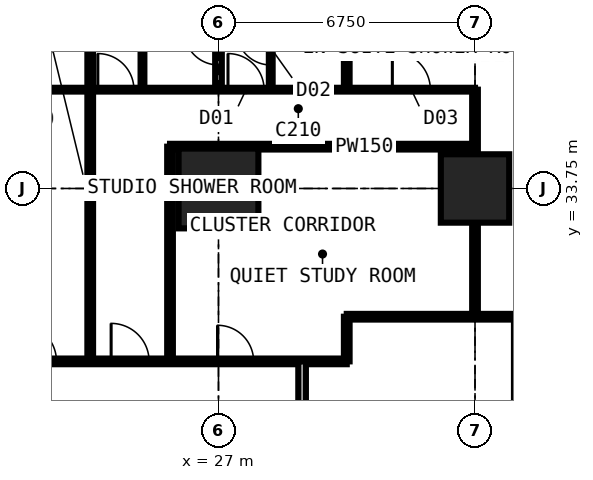
"""IFC4 building model, lengths in metres.
Left out: names, types, materials, properties, quantities, classifications, styles, units other than length and angle.
Written with IfcOpenShell. Run it as: python <this file> out.ifc"""

import sys

from ifc_helpers import new_model, si_unit, direction, frame, frame_2d, origin, origin_2d, place, context, subcontext, project, spatial, rectangle, extrude, element, fill, save


model = new_model("IFC4")
c1 = context("Model", 3, precision=1e-05, world=origin(), true_north=direction((0.0, 1.0)))
c2 = subcontext(c1, "Body", "Model", "MODEL_VIEW")
j1 = project(units=[si_unit("LENGTHUNIT", "METRE"), si_unit("PLANEANGLEUNIT", "RADIAN")], contexts=[c1])
p1 = place(None, origin())
s1 = spatial("IfcSite", under=j1, at=p1, CompositionType="ELEMENT")
p2 = place(p1, origin())
s2 = spatial("IfcBuilding", under=s1, at=p2, CompositionType="ELEMENT")
p3 = place(p2, frame((0.0, 0.0, 72.0)))
s3 = spatial("IfcBuildingStorey", under=s2, at=p3, CompositionType="ELEMENT", Elevation=72.0)
p4 = place(p3, frame((27.0, 33.75, 0.0), z_axis=(0.0, 0.0, 1.0), x_axis=(1.0, 0.0, 0.0)))
e1 = element("IfcColumn", 1, at=p4, inside=s3, PredefinedType="COLUMN", context=c2, shape_type="SweptSolid", body=[
    extrude(rectangle(XDim=2.1, YDim=2.1, at=origin_2d()), origin(), (0.0, 0.0, 1.0), 3.6),
])
p5 = place(p3, frame((33.75, 33.75, 0.0), z_axis=(0.0, 0.0, 1.0), x_axis=(1.0, 0.0, 0.0)))
e2 = element("IfcColumn", 2, at=p5, inside=s3, PredefinedType="COLUMN", context=c2, shape_type="SweptSolid", body=[
    extrude(rectangle(XDim=1.8, YDim=1.8, at=origin_2d()), origin(), (0.0, 0.0, 1.0), 3.6),
])
p6 = place(p3, frame((10.125, 36.35, 0.0), z_axis=(0.0, 0.0, 1.0), x_axis=(1.0, 0.0, 0.0)))
e3 = element("IfcWall", 3, at=p6, inside=s3, PredefinedType="PARTITIONING", context=c2, shape_type="SweptSolid", body=[
    extrude(rectangle(XDim=23.625, YDim=0.1, at=frame_2d((11.812, 0.0))), origin(), (0.0, 0.0, 1.0), 3.3),
])
p7 = place(p6, frame((21.45, 0.0, 0.0)))
e4 = element("IfcOpeningElement", 4, at=p7, cuts=e3, PredefinedType="OPENING", context=c2, shape_type="SweptSolid", body=[
    extrude(rectangle(XDim=1.0, YDim=2.2, at=frame_2d((0.5, 1.1))), frame((0.0, 0.06, 0.0), z_axis=(0.0, -1.0, 0.0), x_axis=(1.0, 0.0, 0.0)), (0.0, 0.0, 1.0), 0.12),
])
p8 = place(p6, frame((17.125, 0.0, 0.0)))
e5 = element("IfcOpeningElement", 5, at=p8, cuts=e3, PredefinedType="OPENING", context=c2, shape_type="SweptSolid", body=[
    extrude(rectangle(XDim=0.95, YDim=2.2, at=frame_2d((0.475, 1.1))), frame((0.0, 0.06, 0.0), z_axis=(0.0, -1.0, 0.0), x_axis=(1.0, 0.0, 0.0)), (0.0, 0.0, 1.0), 0.12),
])
p9 = place(p6, frame((13.7, 0.0, 0.0)))
e6 = element("IfcOpeningElement", 6, at=p9, cuts=e3, PredefinedType="OPENING", context=c2, shape_type="SweptSolid", body=[
    extrude(rectangle(XDim=0.95, YDim=2.2, at=frame_2d((0.475, 1.1))), frame((0.0, 0.06, 0.0), z_axis=(0.0, -1.0, 0.0), x_axis=(1.0, 0.0, 0.0)), (0.0, 0.0, 1.0), 0.12),
])
p10 = place(p6, frame((0.2, 0.0, 0.0)))
e7 = element("IfcOpeningElement", 7, at=p10, cuts=e3, PredefinedType="OPENING", context=c2, shape_type="SweptSolid", body=[
    extrude(rectangle(XDim=0.95, YDim=2.2, at=frame_2d((0.475, 1.1))), frame((0.0, 0.06, 0.0), z_axis=(0.0, -1.0, 0.0), x_axis=(1.0, 0.0, 0.0)), (0.0, 0.0, 1.0), 0.12),
])
p11 = place(p6, frame((3.625, 0.0, 0.0)))
e8 = element("IfcOpeningElement", 8, at=p11, cuts=e3, PredefinedType="OPENING", context=c2, shape_type="SweptSolid", body=[
    extrude(rectangle(XDim=0.95, YDim=2.2, at=frame_2d((0.475, 1.1))), frame((0.0, 0.06, 0.0), z_axis=(0.0, -1.0, 0.0), x_axis=(1.0, 0.0, 0.0)), (0.0, 0.0, 1.0), 0.12),
])
p12 = place(p6, frame((7.0, 0.0, 0.0)))
e9 = element("IfcOpeningElement", 9, at=p12, cuts=e3, PredefinedType="OPENING", context=c2, shape_type="SweptSolid", body=[
    extrude(rectangle(XDim=0.95, YDim=2.2, at=frame_2d((0.475, 1.1))), frame((0.0, 0.06, 0.0), z_axis=(0.0, -1.0, 0.0), x_axis=(1.0, 0.0, 0.0)), (0.0, 0.0, 1.0), 0.12),
])
p13 = place(p6, frame((10.375, 0.0, 0.0)))
e10 = element("IfcOpeningElement", 10, at=p13, cuts=e3, PredefinedType="OPENING", context=c2, shape_type="SweptSolid", body=[
    extrude(rectangle(XDim=0.95, YDim=2.2, at=frame_2d((0.475, 1.1))), frame((0.0, 0.06, 0.0), z_axis=(0.0, -1.0, 0.0), x_axis=(1.0, 0.0, 0.0)), (0.0, 0.0, 1.0), 0.12),
])
p14 = place(p3, frame((11.3, 29.2, 0.0), z_axis=(0.0, 0.0, 1.0), x_axis=(1.0, 0.0, 0.0)))
e11 = element("IfcWall", 11, at=p14, inside=s3, PredefinedType="PARTITIONING", context=c2, shape_type="SweptSolid", body=[
    extrude(rectangle(XDim=19.075, YDim=0.15, at=frame_2d((9.538, 0.0))), origin(), (0.0, 0.0, 1.0), 3.3),
])
p15 = place(p14, frame((12.875, 0.0, 0.0)))
e12 = element("IfcOpeningElement", 12, at=p15, cuts=e11, PredefinedType="OPENING", context=c2, shape_type="SweptSolid", body=[
    extrude(rectangle(XDim=1.0, YDim=2.2, at=frame_2d((0.5, 1.1))), frame((0.0, 0.085, 0.0), z_axis=(0.0, -1.0, 0.0), x_axis=(1.0, 0.0, 0.0)), (0.0, 0.0, 1.0), 0.17),
])
p16 = place(p14, frame((10.438, 0.0, 0.0)))
e13 = element("IfcOpeningElement", 13, at=p16, cuts=e11, PredefinedType="OPENING", context=c2, shape_type="SweptSolid", body=[
    extrude(rectangle(XDim=1.0, YDim=2.2, at=frame_2d((0.5, 1.1))), frame((0.0, 0.085, 0.0), z_axis=(0.0, -1.0, 0.0), x_axis=(1.0, 0.0, 0.0)), (0.0, 0.0, 1.0), 0.17),
])
p17 = place(p14, frame((15.675, 0.0, 0.0)))
e14 = element("IfcOpeningElement", 14, at=p17, cuts=e11, PredefinedType="OPENING", context=c2, shape_type="SweptSolid", body=[
    extrude(rectangle(XDim=0.95, YDim=2.2, at=frame_2d((0.475, 1.1))), frame((0.0, 0.085, 0.0), z_axis=(0.0, -1.0, 0.0), x_axis=(1.0, 0.0, 0.0)), (0.0, 0.0, 1.0), 0.17),
])
p18 = place(p3, frame((23.625, 29.2, 0.0), z_axis=(0.0, 0.0, 1.0), x_axis=(0.0, 1.0, 0.0)))
e15 = element("IfcWall", 15, at=p18, inside=s3, PredefinedType="PARTITIONING", context=c2, shape_type="SweptSolid", body=[
    extrude(rectangle(XDim=12.034, YDim=0.15, at=frame_2d((6.017, 0.0))), origin(), (0.0, 0.0, 1.0), 3.3),
])
p19 = place(p3, frame((25.0, 36.35, 0.0), z_axis=(0.0, 0.0, 1.0), x_axis=(0.0, 1.0, 0.0)))
e16 = element("IfcWall", 16, at=p19, inside=s3, PredefinedType="PARTITIONING", context=c2, shape_type="SweptSolid", body=[
    extrude(rectangle(XDim=2.2, YDim=0.1, at=frame_2d((1.1, 0.0))), origin(), (0.0, 0.0, 1.0), 3.3),
])
p20 = place(p3, frame((25.725, 29.2, 0.0), z_axis=(0.0, 0.0, 1.0), x_axis=(0.0, 1.0, 0.0)))
e17 = element("IfcWall", 17, at=p20, inside=s3, PredefinedType="PARTITIONING", context=c2, shape_type="SweptSolid", body=[
    extrude(rectangle(XDim=5.65, YDim=0.15, at=frame_2d((2.825, 0.0))), origin(), (0.0, 0.0, 1.0), 3.3),
])
p21 = place(p3, frame((25.725, 34.85, 0.0), z_axis=(0.0, 0.0, 1.0), x_axis=(1.0, 0.0, 0.0)))
e18 = element("IfcWall", 18, at=p21, inside=s3, PredefinedType="PARTITIONING", context=c2, shape_type="SweptSolid", body=[
    extrude(rectangle(XDim=8.025, YDim=0.15, at=frame_2d((4.012, 0.0))), origin(), (0.0, 0.0, 1.0), 3.3),
])
p22 = place(p3, frame((27.0, 36.35, 0.0), z_axis=(0.0, 0.0, 1.0), x_axis=(0.0, 1.0, 0.0)))
e19 = element("IfcWall", 19, at=p22, inside=s3, PredefinedType="PARTITIONING", context=c2, shape_type="SweptSolid", body=[
    extrude(rectangle(XDim=4.884, YDim=0.175, at=frame_2d((2.442, 0.0))), origin(), (0.0, 0.0, 1.0), 2.802),
])
p23 = place(p22, frame((0.65, 0.0, 0.0)))
e20 = element("IfcOpeningElement", 20, at=p23, cuts=e19, PredefinedType="OPENING", context=c2, shape_type="SweptSolid", body=[
    extrude(rectangle(XDim=0.9, YDim=2.2, at=frame_2d((0.45, 1.1))), frame((0.0, 0.097, 0.0), z_axis=(0.0, -1.0, 0.0), x_axis=(1.0, 0.0, 0.0)), (0.0, 0.0, 1.0), 0.195),
])
p24 = place(p3, frame((28.375, 36.35, 0.0), z_axis=(0.0, 0.0, 1.0), x_axis=(0.0, 1.0, 0.0)))
e21 = element("IfcWall", 21, at=p24, inside=s3, PredefinedType="PARTITIONING", context=c2, shape_type="SweptSolid", body=[
    extrude(rectangle(XDim=2.2, YDim=0.1, at=frame_2d((1.1, 0.0))), origin(), (0.0, 0.0, 1.0), 3.3),
])
p25 = place(p24, frame((0.65, 0.0, 0.0)))
e22 = element("IfcOpeningElement", 22, at=p25, cuts=e21, PredefinedType="OPENING", context=c2, shape_type="SweptSolid", body=[
    extrude(rectangle(XDim=0.9, YDim=2.2, at=frame_2d((0.45, 1.1))), frame((0.0, 0.06, 0.0), z_axis=(0.0, -1.0, 0.0), x_axis=(1.0, 0.0, 0.0)), (0.0, 0.0, 1.0), 0.12),
])
p26 = place(p3, frame((29.2, 11.3, 0.0), z_axis=(0.0, 0.0, 1.0), x_axis=(0.0, 1.0, 0.0)))
e23 = element("IfcWall", 23, at=p26, inside=s3, PredefinedType="PARTITIONING", context=c2, shape_type="SweptSolid", body=[
    extrude(rectangle(XDim=17.9, YDim=0.2, at=frame_2d((8.95, 0.0))), origin(), (0.0, 0.0, 1.0), 3.3),
])
p27 = place(p26, frame((8.35, 0.0, 0.0)))
e24 = element("IfcOpeningElement", 24, at=p27, cuts=e23, PredefinedType="OPENING", context=c2, shape_type="SweptSolid", body=[
    extrude(rectangle(XDim=1.2, YDim=2.2, at=frame_2d((0.6, 1.1))), frame((0.0, 0.11, 0.0), z_axis=(0.0, -1.0, 0.0), x_axis=(1.0, 0.0, 0.0)), (0.0, 0.0, 1.0), 0.22),
])
p28 = place(p3, frame((30.375, 29.2, 0.0), z_axis=(0.0, 0.0, 1.0), x_axis=(0.0, 1.0, 0.0)))
e25 = element("IfcWall", 25, at=p28, inside=s3, PredefinedType="PARTITIONING", context=c2, shape_type="SweptSolid", body=[
    extrude(rectangle(XDim=1.175, YDim=0.15, at=frame_2d((0.587, 0.0))), origin(), (0.0, 0.0, 1.0), 3.3),
])
p29 = place(p3, frame((30.375, 30.375, 0.0), z_axis=(0.0, 0.0, 1.0), x_axis=(1.0, 0.0, 0.0)))
e26 = element("IfcWall", 26, at=p29, inside=s3, PredefinedType="PARTITIONING", context=c2, shape_type="SweptSolid", body=[
    extrude(rectangle(XDim=10.859, YDim=0.15, at=frame_2d((5.429, 0.0))), origin(), (0.0, 0.0, 1.0), 3.3),
])
p30 = place(p3, frame((30.375, 36.35, 0.0), z_axis=(0.0, 0.0, 1.0), x_axis=(0.0, 1.0, 0.0)))
e27 = element("IfcWall", 27, at=p30, inside=s3, PredefinedType="PARTITIONING", context=c2, shape_type="SweptSolid", body=[
    extrude(rectangle(XDim=4.884, YDim=0.15, at=frame_2d((2.442, 0.0))), origin(), (0.0, 0.0, 1.0), 3.3),
])
p31 = place(p3, frame((33.75, 30.375, 0.0), z_axis=(0.0, 0.0, 1.0), x_axis=(0.0, 1.0, 0.0)))
e28 = element("IfcWall", 28, at=p31, inside=s3, PredefinedType="PARTITIONING", context=c2, shape_type="SweptSolid", body=[
    extrude(rectangle(XDim=5.975, YDim=0.15, at=frame_2d((2.988, 0.0))), origin(), (0.0, 0.0, 1.0), 2.802),
])
p32 = place(p7, origin())
e29 = element("IfcDoor", 29, at=p32, inside=s3, OperationType="SINGLE_SWING_LEFT", PredefinedType="DOOR", context=c2, shape_type="SweptSolid", body=[
    extrude(rectangle(XDim=1.0, YDim=2.2, at=frame_2d((0.5, 1.1))), frame((0.0, 0.025, 0.0), z_axis=(0.0, -1.0, 0.0), x_axis=(1.0, 0.0, 0.0)), (0.0, 0.0, 1.0), 0.05),
])
fill(e4, e29)
p33 = place(p8, origin())
e30 = element("IfcDoor", 30, at=p33, inside=s3, OperationType="SINGLE_SWING_LEFT", PredefinedType="DOOR", context=c2, shape_type="SweptSolid", body=[
    extrude(rectangle(XDim=0.95, YDim=2.2, at=frame_2d((0.475, 1.1))), frame((0.0, 0.025, 0.0), z_axis=(0.0, -1.0, 0.0), x_axis=(1.0, 0.0, 0.0)), (0.0, 0.0, 1.0), 0.05),
])
fill(e5, e30)
p34 = place(p25, origin())
e31 = element("IfcDoor", 31, at=p34, inside=s3, OperationType="SINGLE_SWING_RIGHT", PredefinedType="DOOR", context=c2, shape_type="SweptSolid", body=[
    extrude(rectangle(XDim=0.9, YDim=2.2, at=frame_2d((0.45, 1.1))), frame((0.0, 0.025, 0.0), z_axis=(0.0, -1.0, 0.0), x_axis=(1.0, 0.0, 0.0)), (0.0, 0.0, 1.0), 0.05),
])
fill(e22, e31)
p35 = place(p9, origin())
e32 = element("IfcDoor", 32, at=p35, inside=s3, OperationType="SINGLE_SWING_LEFT", PredefinedType="DOOR", context=c2, shape_type="SweptSolid", body=[
    extrude(rectangle(XDim=0.95, YDim=2.2, at=frame_2d((0.475, 1.1))), frame((0.0, 0.025, 0.0), z_axis=(0.0, -1.0, 0.0), x_axis=(1.0, 0.0, 0.0)), (0.0, 0.0, 1.0), 0.05),
])
fill(e6, e32)
p36 = place(p23, origin())
e33 = element("IfcDoor", 33, at=p36, inside=s3, OperationType="SINGLE_SWING_RIGHT", PredefinedType="DOOR", context=c2, shape_type="SweptSolid", body=[
    extrude(rectangle(XDim=0.9, YDim=2.2, at=frame_2d((0.45, 1.1))), frame((0.0, 0.025, 0.0), z_axis=(0.0, -1.0, 0.0), x_axis=(1.0, 0.0, 0.0)), (0.0, 0.0, 1.0), 0.05),
])
fill(e20, e33)
p37 = place(p15, origin())
e34 = element("IfcDoor", 34, at=p37, inside=s3, OperationType="SINGLE_SWING_LEFT", PredefinedType="DOOR", context=c2, shape_type="SweptSolid", body=[
    extrude(rectangle(XDim=1.0, YDim=2.2, at=frame_2d((0.5, 1.1))), frame((0.0, 0.025, 0.0), z_axis=(0.0, -1.0, 0.0), x_axis=(1.0, 0.0, 0.0)), (0.0, 0.0, 1.0), 0.05),
])
fill(e12, e34)
p38 = place(p16, origin())
e35 = element("IfcDoor", 35, at=p38, inside=s3, OperationType="SINGLE_SWING_LEFT", PredefinedType="DOOR", context=c2, shape_type="SweptSolid", body=[
    extrude(rectangle(XDim=1.0, YDim=2.2, at=frame_2d((0.5, 1.1))), frame((0.0, 0.025, 0.0), z_axis=(0.0, -1.0, 0.0), x_axis=(1.0, 0.0, 0.0)), (0.0, 0.0, 1.0), 0.05),
])
fill(e13, e35)
p39 = place(p17, origin())
e36 = element("IfcDoor", 36, at=p39, inside=s3, OperationType="SINGLE_SWING_LEFT", PredefinedType="DOOR", context=c2, shape_type="SweptSolid", body=[
    extrude(rectangle(XDim=0.95, YDim=2.2, at=frame_2d((0.475, 1.1))), frame((0.0, 0.025, 0.0), z_axis=(0.0, -1.0, 0.0), x_axis=(1.0, 0.0, 0.0)), (0.0, 0.0, 1.0), 0.05),
])
fill(e14, e36)
save(model, sys.argv[1])
